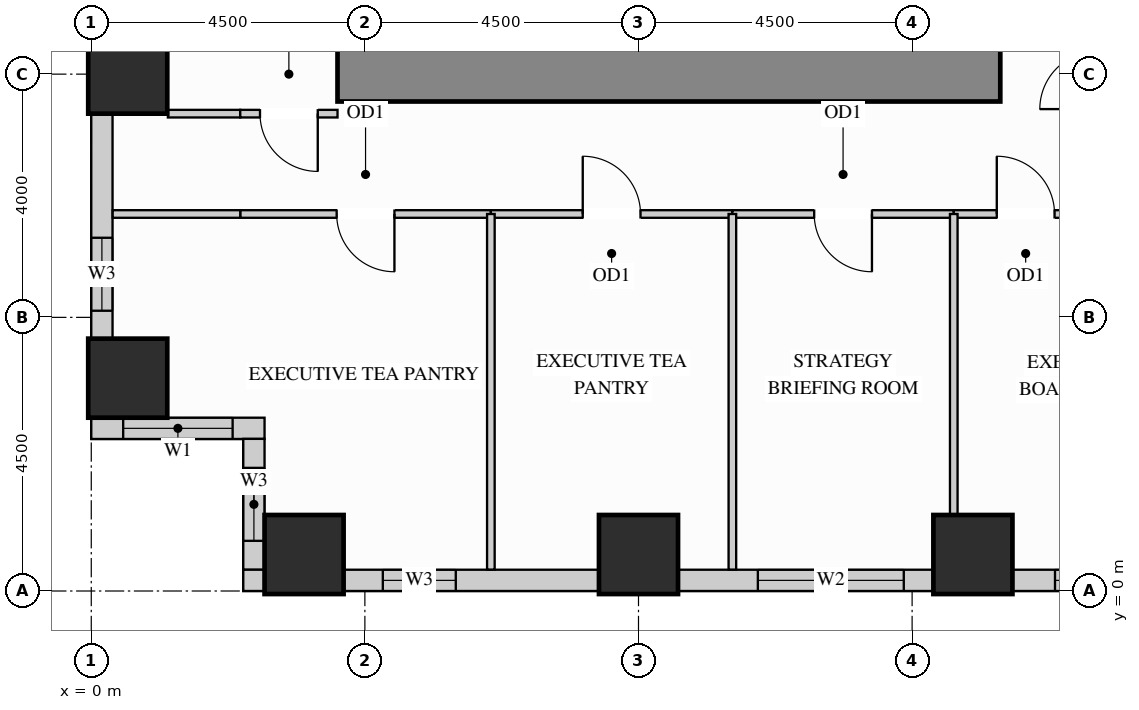
"""IFC4 building model, lengths in metres.
Left out: names, types, materials, properties, quantities, classifications, styles, units other than length and angle.
Written with IfcOpenShell. Run it as: python <this file> out.ifc"""

import sys

from ifc_helpers import new_model, si_unit, direction, frame, frame_2d, origin, origin_2d, place, context, subcontext, project, spatial, rectangle, extrude, source, transform, mapped, element, fill, save


model = new_model("IFC4")
c1 = context("Model", 3, precision=1e-05, world=origin(), true_north=direction((0.0, 1.0)))
c2 = subcontext(c1, "Body", "Model", "MODEL_VIEW")
j1 = project(units=[si_unit("LENGTHUNIT", "METRE"), si_unit("PLANEANGLEUNIT", "RADIAN")], contexts=[c1])
p1 = place(None, origin())
s1 = spatial("IfcSite", under=j1, at=p1, CompositionType="ELEMENT")
p2 = place(p1, origin())
s2 = spatial("IfcBuilding", under=s1, at=p2, CompositionType="ELEMENT")
p3 = place(p2, frame((0.0, 0.0, 69.3)))
s3 = spatial("IfcBuildingStorey", under=s2, at=p3, CompositionType="ELEMENT", Elevation=69.3)
m1 = source(origin(), c2, "Body", "SweptSolid", [
    extrude(rectangle(XDim=1.3, YDim=1.3, at=origin_2d()), origin(), (0.0, 0.0, 1.0), 3.32),
])
for number, where, z_axis, x_axis in (
    (1, (14.5, 0.6, 0.0), (0.0, 0.0, 1.0), (1.0, 0.0, 0.0)),
    (2, (3.5, 0.6, 0.0), (0.0, 0.0, 1.0), (1.0, 0.0, 0.0)),
    (3, (9.0, 0.6, 0.0), (0.0, 0.0, 1.0), (1.0, 0.0, 0.0)),
    (4, (0.6, 3.5, 0.0), (0.0, 0.0, 1.0), (1.0, 0.0, 0.0)),
    (5, (0.6, 8.5, 0.0), (0.0, 0.0, 1.0), (1.0, 0.0, 0.0)),
):
    element("IfcColumn", number, at=place(p3, frame(where, z_axis=z_axis, x_axis=x_axis)), inside=s3, PredefinedType="COLUMN", context=c2, shape_type="MappedRepresentation", body=[
        mapped(m1, transform((0.0, 0.0, 0.0), x_axis=(1.0, 0.0, 0.0), y_axis=(0.0, 1.0, 0.0), z_axis=(0.0, 0.0, 1.0))),
    ])
m2 = source(origin(), c2, "Body", "SweptSolid", [
    extrude(rectangle(XDim=10.9, YDim=0.9, at=frame_2d((5.45, 0.0))), origin(), (0.0, 0.0, 1.0), 3.32),
])
p4 = place(p3, frame((4.05, 8.5, 0.0), z_axis=(0.0, 0.0, 1.0), x_axis=(1.0, 0.0, 0.0)))
e6 = element("IfcWall", 6, at=p4, inside=s3, PredefinedType="SHEAR", context=c2, shape_type="MappedRepresentation", body=[
    mapped(m2, transform((0.0, 0.0, 0.0), x_axis=(1.0, 0.0, 0.0), y_axis=(0.0, 1.0, 0.0), z_axis=(0.0, 0.0, 1.0))),
])
p5 = place(p3, frame((0.175, 7.852, 0.0), z_axis=(0.0, 0.0, 1.0), x_axis=(0.0, -1.0, 0.0)))
e7 = element("IfcWall", 7, at=p5, inside=s3, PredefinedType="SOLIDWALL", context=c2, shape_type="SweptSolid", body=[
    extrude(rectangle(XDim=3.704, YDim=0.35, at=frame_2d((1.852, 0.0))), origin(), (0.0, 0.0, 1.0), 2.45),
])
p6 = place(p5, frame((2.043, 0.0, 0.78)))
e8 = element("IfcOpeningElement", 8, at=p6, cuts=e7, PredefinedType="OPENING", context=c2, shape_type="SweptSolid", body=[
    extrude(rectangle(XDim=1.2, YDim=1.49, at=frame_2d((0.6, 0.745))), frame((0.0, 0.185, 0.0), z_axis=(0.0, -1.0, 0.0), x_axis=(1.0, 0.0, 0.0)), (0.0, 0.0, 1.0), 0.37),
])
p7 = place(p3, frame((0.0, 2.675, 0.0), z_axis=(0.0, 0.0, 1.0), x_axis=(1.0, 0.0, 0.0)))
e9 = element("IfcWall", 9, at=p7, inside=s3, PredefinedType="SOLIDWALL", context=c2, shape_type="SweptSolid", body=[
    extrude(rectangle(XDim=2.85, YDim=0.35, at=frame_2d((1.425, 0.0))), origin(), (0.0, 0.0, 1.0), 3.305),
])
p8 = place(p7, frame((0.525, 0.0, 0.78)))
e10 = element("IfcOpeningElement", 10, at=p8, cuts=e9, PredefinedType="OPENING", context=c2, shape_type="SweptSolid", body=[
    extrude(rectangle(XDim=1.8, YDim=2.1, at=frame_2d((0.9, 1.05))), frame((0.0, 0.185, 0.0), z_axis=(0.0, -1.0, 0.0), x_axis=(1.0, 0.0, 0.0)), (0.0, 0.0, 1.0), 0.37),
])
p9 = place(p3, frame((2.675, 2.502, 0.0), z_axis=(0.0, 0.0, 1.0), x_axis=(0.0, -1.0, 0.0)))
e11 = element("IfcWall", 11, at=p9, inside=s3, PredefinedType="SOLIDWALL", context=c2, shape_type="SweptSolid", body=[
    extrude(rectangle(XDim=2.154, YDim=0.35, at=frame_2d((1.077, 0.0))), origin(), (0.0, 0.0, 1.0), 3.305),
])
p10 = place(p9, frame((0.477, 0.0, 0.78)))
e12 = element("IfcOpeningElement", 12, at=p10, cuts=e11, PredefinedType="OPENING", context=c2, shape_type="SweptSolid", body=[
    extrude(rectangle(XDim=1.2, YDim=2.1, at=frame_2d((0.6, 1.05))), frame((0.0, 0.185, 0.0), z_axis=(0.0, -1.0, 0.0), x_axis=(1.0, 0.0, 0.0)), (0.0, 0.0, 1.0), 0.37),
])
m3 = source(origin(), c2, "Body", "SweptSolid", [
    extrude(rectangle(XDim=0.352, YDim=0.35, at=frame_2d((0.176, 0.0))), origin(), (0.0, 0.0, 1.0), 3.305),
])
p11 = place(p3, frame((2.5, 0.175, 0.0), z_axis=(0.0, 0.0, 1.0), x_axis=(1.0, 0.0, 0.0)))
e13 = element("IfcWall", 13, at=p11, inside=s3, PredefinedType="SOLIDWALL", context=c2, shape_type="MappedRepresentation", body=[
    mapped(m3, transform((0.0, 0.0, 0.0), x_axis=(1.0, 0.0, 0.0), y_axis=(0.0, 1.0, 0.0), z_axis=(0.0, 0.0, 1.0))),
])
p12 = place(p3, frame((4.148, 0.175, 0.0), z_axis=(0.0, 0.0, 1.0), x_axis=(1.0, 0.0, 0.0)))
e14 = element("IfcWall", 14, at=p12, inside=s3, PredefinedType="SOLIDWALL", context=c2, shape_type="SweptSolid", body=[
    extrude(rectangle(XDim=4.204, YDim=0.35, at=frame_2d((2.102, 0.0))), origin(), (0.0, 0.0, 1.0), 2.45),
])
p13 = place(p12, frame((0.647, 0.0, 0.78)))
e15 = element("IfcOpeningElement", 15, at=p13, cuts=e14, PredefinedType="OPENING", context=c2, shape_type="SweptSolid", body=[
    extrude(rectangle(XDim=1.2, YDim=1.49, at=frame_2d((0.6, 0.745))), frame((0.0, 0.185, 0.0), z_axis=(0.0, -1.0, 0.0), x_axis=(1.0, 0.0, 0.0)), (0.0, 0.0, 1.0), 0.37),
])
p14 = place(p3, frame((9.648, 0.175, 0.0), z_axis=(0.0, 0.0, 1.0), x_axis=(1.0, 0.0, 0.0)))
e16 = element("IfcWall", 16, at=p14, inside=s3, PredefinedType="SOLIDWALL", context=c2, shape_type="SweptSolid", body=[
    extrude(rectangle(XDim=4.204, YDim=0.35, at=frame_2d((2.102, 0.0))), origin(), (0.0, 0.0, 1.0), 2.45),
])
p15 = place(p14, frame((1.315, 0.0, 0.78)))
e17 = element("IfcOpeningElement", 17, at=p15, cuts=e16, PredefinedType="OPENING", context=c2, shape_type="SweptSolid", body=[
    extrude(rectangle(XDim=2.4, YDim=1.49, at=frame_2d((1.2, 0.745))), frame((0.0, 0.185, 0.0), z_axis=(0.0, -1.0, 0.0), x_axis=(1.0, 0.0, 0.0)), (0.0, 0.0, 1.0), 0.37),
])
p16 = place(p3, frame((15.148, 0.175, 0.0), z_axis=(0.0, 0.0, 1.0), x_axis=(1.0, 0.0, 0.0)))
e18 = element("IfcWall", 18, at=p16, inside=s3, PredefinedType="SOLIDWALL", context=c2, shape_type="SweptSolid", body=[
    extrude(rectangle(XDim=3.204, YDim=0.35, at=frame_2d((1.602, 0.0))), origin(), (0.0, 0.0, 1.0), 2.45),
])
p17 = place(p16, frame((0.702, 0.0, 0.78)))
e19 = element("IfcOpeningElement", 19, at=p17, cuts=e18, PredefinedType="OPENING", context=c2, shape_type="SweptSolid", body=[
    extrude(rectangle(XDim=1.8, YDim=1.49, at=frame_2d((0.9, 0.745))), frame((0.0, 0.185, 0.0), z_axis=(0.0, -1.0, 0.0), x_axis=(1.0, 0.0, 0.0)), (0.0, 0.0, 1.0), 0.37),
])
m4 = source(origin(), c2, "Body", "SweptSolid", [
    extrude(rectangle(XDim=1.19, YDim=0.125, at=frame_2d((0.595, 0.0))), origin(), (0.0, 0.0, 1.0), 3.305),
])
p18 = place(p3, frame((1.26, 7.85, 0.0), z_axis=(0.0, 0.0, 1.0), x_axis=(1.0, 0.0, 0.0)))
e20 = element("IfcWall", 20, at=p18, inside=s3, PredefinedType="PARTITIONING", context=c2, shape_type="MappedRepresentation", body=[
    mapped(m4, transform((0.0, 0.0, 0.0), x_axis=(1.0, 0.0, 0.0), y_axis=(0.0, 1.0, 0.0), z_axis=(0.0, 0.0, 1.0))),
])
p19 = place(p3, frame((2.45, 7.85, 0.0), z_axis=(0.0, 0.0, 1.0), x_axis=(1.0, 0.0, 0.0)))
e21 = element("IfcWall", 21, at=p19, inside=s3, PredefinedType="PARTITIONING", context=c2, shape_type="SweptSolid", body=[
    extrude(rectangle(XDim=1.6, YDim=0.125, at=frame_2d((0.8, 0.0))), origin(), (0.0, 0.0, 1.0), 3.305),
])
p20 = place(p19, frame((0.325, 0.0, 0.0)))
e22 = element("IfcOpeningElement", 22, at=p20, cuts=e21, PredefinedType="OPENING", context=c2, shape_type="SweptSolid", body=[
    extrude(rectangle(XDim=0.95, YDim=2.15, at=frame_2d((0.475, 1.075))), frame((0.0, 0.073, 0.0), z_axis=(0.0, -1.0, 0.0), x_axis=(1.0, 0.0, 0.0)), (0.0, 0.0, 1.0), 0.145),
])
p21 = place(p3, frame((2.45, 6.2, 0.0), z_axis=(0.0, 0.0, 1.0), x_axis=(1.0, 0.0, 0.0)))
e23 = element("IfcWall", 23, at=p21, inside=s3, PredefinedType="PARTITIONING", context=c2, shape_type="SweptSolid", body=[
    extrude(rectangle(XDim=4.122, YDim=0.125, at=frame_2d((2.061, 0.0))), origin(), (0.0, 0.0, 1.0), 2.768),
])
p22 = place(p21, frame((1.586, 0.0, 0.0)))
e24 = element("IfcOpeningElement", 24, at=p22, cuts=e23, PredefinedType="OPENING", context=c2, shape_type="SweptSolid", body=[
    extrude(rectangle(XDim=0.95, YDim=2.15, at=frame_2d((0.475, 1.075))), frame((0.0, 0.073, 0.0), z_axis=(0.0, -1.0, 0.0), x_axis=(1.0, 0.0, 0.0)), (0.0, 0.0, 1.0), 0.145),
])
p23 = place(p3, frame((6.572, 6.2, 0.0), z_axis=(0.0, 0.0, 1.0), x_axis=(1.0, 0.0, 0.0)))
e25 = element("IfcWall", 25, at=p23, inside=s3, PredefinedType="PARTITIONING", context=c2, shape_type="SweptSolid", body=[
    extrude(rectangle(XDim=3.972, YDim=0.125, at=frame_2d((1.986, 0.0))), origin(), (0.0, 0.0, 1.0), 2.768),
])
p24 = place(p23, frame((1.511, 0.0, 0.0)))
e26 = element("IfcOpeningElement", 26, at=p24, cuts=e25, PredefinedType="OPENING", context=c2, shape_type="SweptSolid", body=[
    extrude(rectangle(XDim=0.95, YDim=2.15, at=frame_2d((0.475, 1.075))), frame((0.0, 0.073, 0.0), z_axis=(0.0, -1.0, 0.0), x_axis=(1.0, 0.0, 0.0)), (0.0, 0.0, 1.0), 0.145),
])
p25 = place(p3, frame((10.544, 6.2, 0.0), z_axis=(0.0, 0.0, 1.0), x_axis=(1.0, 0.0, 0.0)))
e27 = element("IfcWall", 27, at=p25, inside=s3, PredefinedType="PARTITIONING", context=c2, shape_type="SweptSolid", body=[
    extrude(rectangle(XDim=3.641, YDim=0.125, at=frame_2d((1.821, 0.0))), origin(), (0.0, 0.0, 1.0), 2.768),
])
p26 = place(p25, frame((1.345, 0.0, 0.0)))
e28 = element("IfcOpeningElement", 28, at=p26, cuts=e27, PredefinedType="OPENING", context=c2, shape_type="SweptSolid", body=[
    extrude(rectangle(XDim=0.95, YDim=2.15, at=frame_2d((0.475, 1.075))), frame((0.0, 0.073, 0.0), z_axis=(0.0, -1.0, 0.0), x_axis=(1.0, 0.0, 0.0)), (0.0, 0.0, 1.0), 0.145),
])
p27 = place(p3, frame((14.185, 6.2, 0.0), z_axis=(0.0, 0.0, 1.0), x_axis=(1.0, 0.0, 0.0)))
e29 = element("IfcWall", 29, at=p27, inside=s3, PredefinedType="PARTITIONING", context=c2, shape_type="SweptSolid", body=[
    extrude(rectangle(XDim=2.365, YDim=0.125, at=frame_2d((1.183, 0.0))), origin(), (0.0, 0.0, 1.0), 2.768),
])
p28 = place(p27, frame((0.708, 0.0, 0.0)))
e30 = element("IfcOpeningElement", 30, at=p28, cuts=e29, PredefinedType="OPENING", context=c2, shape_type="SweptSolid", body=[
    extrude(rectangle(XDim=0.95, YDim=2.15, at=frame_2d((0.475, 1.075))), frame((0.0, 0.073, 0.0), z_axis=(0.0, -1.0, 0.0), x_axis=(1.0, 0.0, 0.0)), (0.0, 0.0, 1.0), 0.145),
])
m5 = source(origin(), c2, "Body", "SweptSolid", [
    extrude(rectangle(XDim=2.098, YDim=0.125, at=frame_2d((1.049, 0.0))), origin(), (0.0, 0.0, 1.0), 2.768),
])
p29 = place(p3, frame((0.352, 6.2, 0.0), z_axis=(0.0, 0.0, 1.0), x_axis=(1.0, 0.0, 0.0)))
e31 = element("IfcWall", 31, at=p29, inside=s3, PredefinedType="PARTITIONING", context=c2, shape_type="MappedRepresentation", body=[
    mapped(m5, transform((0.0, 0.0, 0.0), x_axis=(1.0, 0.0, 0.0), y_axis=(0.0, 1.0, 0.0), z_axis=(0.0, 0.0, 1.0))),
])
m6 = source(origin(), c2, "Body", "SweptSolid", [
    extrude(rectangle(XDim=5.848, YDim=0.125, at=frame_2d((2.924, 0.0))), origin(), (0.0, 0.0, 1.0), 3.305),
])
for number, where, z_axis, x_axis in (
    (32, (6.572, 0.352, 0.0), (0.0, 0.0, 1.0), (0.0, 1.0, 0.0)),
    (33, (10.544, 0.352, 0.0), (0.0, 0.0, 1.0), (0.0, 1.0, 0.0)),
):
    element("IfcWall", number, at=place(p3, frame(where, z_axis=z_axis, x_axis=x_axis)), inside=s3, PredefinedType="PARTITIONING", context=c2, shape_type="MappedRepresentation", body=[
        mapped(m6, transform((0.0, 0.0, 0.0), x_axis=(1.0, 0.0, 0.0), y_axis=(0.0, 1.0, 0.0), z_axis=(0.0, 0.0, 1.0))),
    ])
m7 = source(origin(), c2, "Body", "SweptSolid", [
    extrude(rectangle(XDim=4.94, YDim=0.125, at=frame_2d((2.47, 0.0))), origin(), (0.0, 0.0, 1.0), 3.305),
])
p30 = place(p3, frame((14.185, 1.26, 0.0), z_axis=(0.0, 0.0, 1.0), x_axis=(0.0, 1.0, 0.0)))
e34 = element("IfcWall", 34, at=p30, inside=s3, PredefinedType="PARTITIONING", context=c2, shape_type="MappedRepresentation", body=[
    mapped(m7, transform((0.0, 0.0, 0.0), x_axis=(1.0, 0.0, 0.0), y_axis=(0.0, 1.0, 0.0), z_axis=(0.0, 0.0, 1.0))),
])
m8 = source(origin(), c2, "Body", "SweptSolid", [
    extrude(rectangle(XDim=0.95, YDim=2.15, at=frame_2d((0.475, 1.075))), frame((0.0, 0.025, 0.0), z_axis=(0.0, -1.0, 0.0), x_axis=(1.0, 0.0, 0.0)), (0.0, 0.0, 1.0), 0.05),
])
p31 = place(p22, origin())
e35 = element("IfcDoor", 35, at=p31, inside=s3, OperationType="SINGLE_SWING_RIGHT", PredefinedType="DOOR", context=c2, shape_type="MappedRepresentation", body=[
    mapped(m8, transform((0.0, 0.0, 0.0), x_axis=(1.0, 0.0, 0.0), y_axis=(0.0, 1.0, 0.0), z_axis=(0.0, 0.0, 1.0))),
])
fill(e24, e35)
p32 = place(p24, origin())
e36 = element("IfcDoor", 36, at=p32, inside=s3, OperationType="SINGLE_SWING_LEFT", PredefinedType="DOOR", context=c2, shape_type="MappedRepresentation", body=[
    mapped(m8, transform((0.0, 0.0, 0.0), x_axis=(1.0, 0.0, 0.0), y_axis=(0.0, 1.0, 0.0), z_axis=(0.0, 0.0, 1.0))),
])
fill(e26, e36)
p33 = place(p26, origin())
e37 = element("IfcDoor", 37, at=p33, inside=s3, OperationType="SINGLE_SWING_RIGHT", PredefinedType="DOOR", context=c2, shape_type="MappedRepresentation", body=[
    mapped(m8, transform((0.0, 0.0, 0.0), x_axis=(1.0, 0.0, 0.0), y_axis=(0.0, 1.0, 0.0), z_axis=(0.0, 0.0, 1.0))),
])
fill(e28, e37)
p34 = place(p28, origin())
e38 = element("IfcDoor", 38, at=p34, inside=s3, OperationType="SINGLE_SWING_LEFT", PredefinedType="DOOR", context=c2, shape_type="MappedRepresentation", body=[
    mapped(m8, transform((0.0, 0.0, 0.0), x_axis=(1.0, 0.0, 0.0), y_axis=(0.0, 1.0, 0.0), z_axis=(0.0, 0.0, 1.0))),
])
fill(e30, e38)
p35 = place(p20, origin())
e39 = element("IfcDoor", 39, at=p35, inside=s3, OperationType="SINGLE_SWING_RIGHT", PredefinedType="DOOR", context=c2, shape_type="MappedRepresentation", body=[
    mapped(m8, transform((0.0, 0.0, 0.0), x_axis=(1.0, 0.0, 0.0), y_axis=(0.0, 1.0, 0.0), z_axis=(0.0, 0.0, 1.0))),
])
fill(e22, e39)
m9 = source(origin(), c2, "Body", "SweptSolid", [
    extrude(rectangle(XDim=1.8, YDim=2.1, at=frame_2d((0.9, 1.05))), frame((0.0, 0.03, 0.0), z_axis=(0.0, -1.0, 0.0), x_axis=(1.0, 0.0, 0.0)), (0.0, 0.0, 1.0), 0.06),
])
p36 = place(p8, origin())
e40 = element("IfcWindow", 40, at=p36, inside=s3, PartitioningType="SINGLE_PANEL", PredefinedType="WINDOW", context=c2, shape_type="MappedRepresentation", body=[
    mapped(m9, transform((0.0, 0.0, 0.0), x_axis=(1.0, 0.0, 0.0), y_axis=(0.0, 1.0, 0.0), z_axis=(0.0, 0.0, 1.0))),
])
fill(e10, e40)
m10 = source(origin(), c2, "Body", "SweptSolid", [
    extrude(rectangle(XDim=1.8, YDim=1.49, at=frame_2d((0.9, 0.745))), frame((0.0, 0.03, 0.0), z_axis=(0.0, -1.0, 0.0), x_axis=(1.0, 0.0, 0.0)), (0.0, 0.0, 1.0), 0.06),
])
p37 = place(p17, origin())
e41 = element("IfcWindow", 41, at=p37, inside=s3, PartitioningType="SINGLE_PANEL", PredefinedType="WINDOW", context=c2, shape_type="MappedRepresentation", body=[
    mapped(m10, transform((0.0, 0.0, 0.0), x_axis=(1.0, 0.0, 0.0), y_axis=(0.0, 1.0, 0.0), z_axis=(0.0, 0.0, 1.0))),
])
fill(e19, e41)
m11 = source(origin(), c2, "Body", "SweptSolid", [
    extrude(rectangle(XDim=2.4, YDim=1.49, at=frame_2d((1.2, 0.745))), frame((0.0, 0.03, 0.0), z_axis=(0.0, -1.0, 0.0), x_axis=(1.0, 0.0, 0.0)), (0.0, 0.0, 1.0), 0.06),
])
p38 = place(p15, origin())
e42 = element("IfcWindow", 42, at=p38, inside=s3, PartitioningType="SINGLE_PANEL", PredefinedType="WINDOW", context=c2, shape_type="MappedRepresentation", body=[
    mapped(m11, transform((0.0, 0.0, 0.0), x_axis=(1.0, 0.0, 0.0), y_axis=(0.0, 1.0, 0.0), z_axis=(0.0, 0.0, 1.0))),
])
fill(e17, e42)
m12 = source(origin(), c2, "Body", "SweptSolid", [
    extrude(rectangle(XDim=1.2, YDim=1.49, at=frame_2d((0.6, 0.745))), frame((0.0, 0.03, 0.0), z_axis=(0.0, -1.0, 0.0), x_axis=(1.0, 0.0, 0.0)), (0.0, 0.0, 1.0), 0.06),
])
p39 = place(p6, origin())
e43 = element("IfcWindow", 43, at=p39, inside=s3, PartitioningType="SINGLE_PANEL", PredefinedType="WINDOW", context=c2, shape_type="MappedRepresentation", body=[
    mapped(m12, transform((0.0, 0.0, 0.0), x_axis=(1.0, 0.0, 0.0), y_axis=(0.0, 1.0, 0.0), z_axis=(0.0, 0.0, 1.0))),
])
fill(e8, e43)
m13 = source(origin(), c2, "Body", "SweptSolid", [
    extrude(rectangle(XDim=1.2, YDim=2.1, at=frame_2d((0.6, 1.05))), frame((0.0, 0.03, 0.0), z_axis=(0.0, -1.0, 0.0), x_axis=(1.0, 0.0, 0.0)), (0.0, 0.0, 1.0), 0.06),
])
p40 = place(p10, origin())
e44 = element("IfcWindow", 44, at=p40, inside=s3, PartitioningType="SINGLE_PANEL", PredefinedType="WINDOW", context=c2, shape_type="MappedRepresentation", body=[
    mapped(m13, transform((0.0, 0.0, 0.0), x_axis=(1.0, 0.0, 0.0), y_axis=(0.0, 1.0, 0.0), z_axis=(0.0, 0.0, 1.0))),
])
fill(e12, e44)
p41 = place(p13, origin())
e45 = element("IfcWindow", 45, at=p41, inside=s3, PartitioningType="SINGLE_PANEL", PredefinedType="WINDOW", context=c2, shape_type="MappedRepresentation", body=[
    mapped(m12, transform((0.0, 0.0, 0.0), x_axis=(1.0, 0.0, 0.0), y_axis=(0.0, 1.0, 0.0), z_axis=(0.0, 0.0, 1.0))),
])
fill(e15, e45)
save(model, sys.argv[1])
